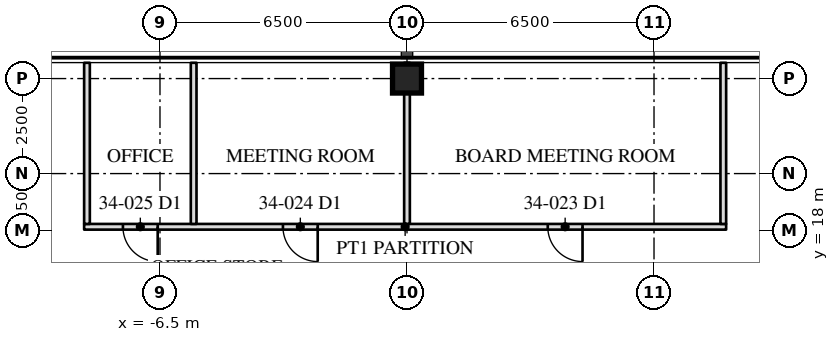
"""IFC4 building model, lengths in metres.
Left out: names, types, materials, properties, quantities, classifications, styles, units other than length and angle.
Written with IfcOpenShell. Run it as: python <this file> out.ifc"""

import sys

from ifc_helpers import new_model, si_unit, direction, frame, frame_2d, origin, origin_2d, place, context, subcontext, project, spatial, rectangle, hollow_rectangle, extrude, element, fill, save


model = new_model("IFC4")
c1 = context("Model", 3, precision=1e-05, world=origin(), true_north=direction((0.0, 1.0)))
c2 = subcontext(c1, "Body", "Model", "MODEL_VIEW")
j1 = project(units=[si_unit("LENGTHUNIT", "METRE"), si_unit("PLANEANGLEUNIT", "RADIAN")], contexts=[c1])
p1 = place(None, origin())
s1 = spatial("IfcSite", under=j1, at=p1, CompositionType="ELEMENT")
p2 = place(p1, origin())
s2 = spatial("IfcBuilding", under=s1, at=p2, CompositionType="ELEMENT")
p3 = place(p2, frame((0.0, 0.0, 145.9)))
s3 = spatial("IfcBuildingStorey", under=s2, at=p3, CompositionType="ELEMENT", Elevation=145.9)
p4 = place(p3, frame((0.0, 22.0, 0.0), z_axis=(0.0, 0.0, 1.0), x_axis=(1.0, 0.0, 0.0)))
e1 = element("IfcColumn", 1, at=p4, inside=s3, PredefinedType="COLUMN", context=c2, shape_type="SweptSolid", body=[
    extrude(hollow_rectangle(XDim=0.762, YDim=0.762, WallThickness=0.076, at=origin_2d()), origin(), (0.0, 0.0, 1.0), 4.1),
])
p5 = place(p3, frame((8.398, 18.1, 0.0), z_axis=(0.0, 0.0, 1.0), x_axis=(-1.0, 0.0, 0.0)))
e2 = element("IfcWall", 2, at=p5, inside=s3, PredefinedType="PARTITIONING", context=c2, shape_type="SweptSolid", body=[
    extrude(rectangle(XDim=16.894, YDim=0.15, at=frame_2d((8.447, 0.0))), origin(), (0.0, 0.0, 1.0), 3.91),
])
p6 = place(p5, frame((3.779, 0.0, 0.0)))
e3 = element("IfcOpeningElement", 3, at=p6, cuts=e2, PredefinedType="OPENING", context=c2, shape_type="SweptSolid", body=[
    extrude(rectangle(XDim=0.915, YDim=2.134, at=frame_2d((0.458, 1.067))), frame((0.0, 0.085, 0.0), z_axis=(0.0, -1.0, 0.0), x_axis=(1.0, 0.0, 0.0)), (0.0, 0.0, 1.0), 0.17),
])
p7 = place(p5, frame((10.748, 0.0, 0.0)))
e4 = element("IfcOpeningElement", 4, at=p7, cuts=e2, PredefinedType="OPENING", context=c2, shape_type="SweptSolid", body=[
    extrude(rectangle(XDim=0.915, YDim=2.134, at=frame_2d((0.458, 1.067))), frame((0.0, 0.085, 0.0), z_axis=(0.0, -1.0, 0.0), x_axis=(1.0, 0.0, 0.0)), (0.0, 0.0, 1.0), 0.17),
])
p8 = place(p5, frame((14.958, 0.0, 0.0)))
e5 = element("IfcOpeningElement", 5, at=p8, cuts=e2, PredefinedType="OPENING", context=c2, shape_type="SweptSolid", body=[
    extrude(rectangle(XDim=0.915, YDim=2.134, at=frame_2d((0.458, 1.067))), frame((0.0, 0.085, 0.0), z_axis=(0.0, -1.0, 0.0), x_axis=(1.0, 0.0, 0.0)), (0.0, 0.0, 1.0), 0.17),
])
p9 = place(p3, frame((8.323, 18.175, 0.0), z_axis=(0.0, 0.0, 1.0), x_axis=(0.0, 1.0, 0.0)))
e6 = element("IfcWall", 6, at=p9, inside=s3, PredefinedType="PARTITIONING", context=c2, shape_type="SweptSolid", body=[
    extrude(rectangle(XDim=4.24, YDim=0.15, at=frame_2d((2.12, 0.0))), origin(), (0.0, 0.0, 1.0), 3.91),
])
p10 = place(p3, frame((0.0, 18.175, 0.0), z_axis=(0.0, 0.0, 1.0), x_axis=(0.0, 1.0, 0.0)))
e7 = element("IfcWall", 7, at=p10, inside=s3, PredefinedType="PARTITIONING", context=c2, shape_type="SweptSolid", body=[
    extrude(rectangle(XDim=4.24, YDim=0.15, at=frame_2d((2.12, 0.0))), origin(), (0.0, 0.0, 1.0), 3.326),
])
for number, where, z_axis, x_axis in (
    (8, (-5.614, 18.175, 0.0), (0.0, 0.0, 1.0), (0.0, 1.0, 0.0)),
    (9, (-8.421, 18.175, 0.0), (0.0, 0.0, 1.0), (0.0, 1.0, 0.0)),
):
    element("IfcWall", number, at=place(p3, frame(where, z_axis=z_axis, x_axis=x_axis)), inside=s3, PredefinedType="PARTITIONING", context=c2, shape_type="SweptSolid", body=[
        extrude(rectangle(XDim=4.24, YDim=0.15, at=frame_2d((2.12, 0.0))), origin(), (0.0, 0.0, 1.0), 3.91),
    ])
p11 = place(p6, origin())
e10 = element("IfcDoor", 10, at=p11, inside=s3, OperationType="SINGLE_SWING_LEFT", PredefinedType="DOOR", context=c2, shape_type="SweptSolid", body=[
    extrude(rectangle(XDim=0.915, YDim=2.134, at=frame_2d((0.458, 1.067))), frame((0.0, 0.025, 0.0), z_axis=(0.0, -1.0, 0.0), x_axis=(1.0, 0.0, 0.0)), (0.0, 0.0, 1.0), 0.05),
])
fill(e3, e10)
p12 = place(p7, origin())
e11 = element("IfcDoor", 11, at=p12, inside=s3, OperationType="SINGLE_SWING_LEFT", PredefinedType="DOOR", context=c2, shape_type="SweptSolid", body=[
    extrude(rectangle(XDim=0.915, YDim=2.134, at=frame_2d((0.458, 1.067))), frame((0.0, 0.025, 0.0), z_axis=(0.0, -1.0, 0.0), x_axis=(1.0, 0.0, 0.0)), (0.0, 0.0, 1.0), 0.05),
])
fill(e4, e11)
p13 = place(p8, origin())
e12 = element("IfcDoor", 12, at=p13, inside=s3, OperationType="SINGLE_SWING_LEFT", PredefinedType="DOOR", context=c2, shape_type="SweptSolid", body=[
    extrude(rectangle(XDim=0.915, YDim=2.134, at=frame_2d((0.458, 1.067))), frame((0.0, 0.025, 0.0), z_axis=(0.0, -1.0, 0.0), x_axis=(1.0, 0.0, 0.0)), (0.0, 0.0, 1.0), 0.05),
])
fill(e5, e12)
save(model, sys.argv[1])
